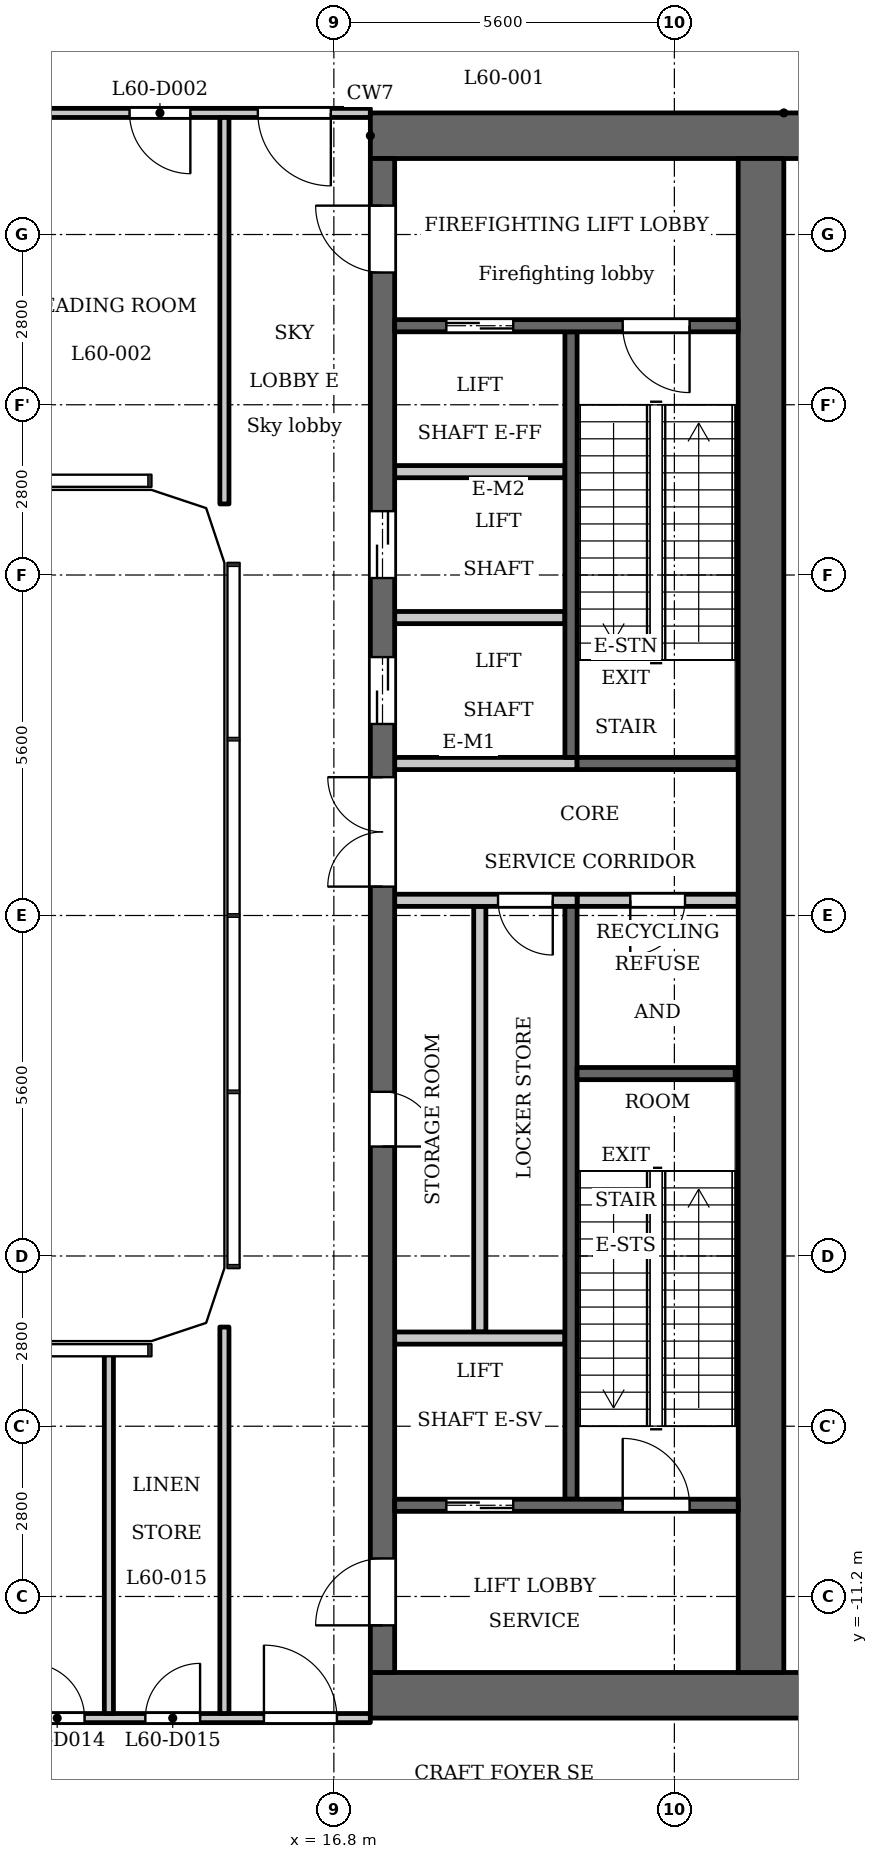
"""IFC4 building model, lengths in metres.
Left out: names, types, materials, properties, quantities, classifications, styles, units other than length and angle.
Written with IfcOpenShell. Run it as: python <this file> out.ifc"""

import sys

from ifc_helpers import new_model, si_unit, direction, frame, frame_2d, origin, place, context, subcontext, project, spatial, polyline, rectangle, outline, extrude, element, fill, save


model = new_model("IFC4")
c1 = context("Model", 3, precision=1e-05, world=origin(), true_north=direction((0.0, 1.0)))
c2 = subcontext(c1, "Body", "Model", "MODEL_VIEW")
j1 = project(units=[si_unit("LENGTHUNIT", "METRE"), si_unit("PLANEANGLEUNIT", "RADIAN")], contexts=[c1])
p1 = place(None, origin())
s1 = spatial("IfcSite", under=j1, at=p1, CompositionType="ELEMENT")
p2 = place(p1, origin())
s2 = spatial("IfcBuilding", under=s1, at=p2, CompositionType="ELEMENT")
p3 = place(p2, frame((0.0, 0.0, 230.9)))
s3 = spatial("IfcBuildingStorey", under=s2, at=p3, CompositionType="ELEMENT", Elevation=230.9)
p4 = place(p3, frame((20.7, 2.6, 0.0), z_axis=(0.0, 0.0, 1.0), x_axis=(0.0, 1.0, 0.0)))
e1 = element("IfcWall", 1, at=p4, inside=s3, PredefinedType="SHEAR", context=c2, shape_type="SweptSolid", body=[
    extrude(rectangle(XDim=7.0, YDim=0.2, at=frame_2d((3.5, 0.0))), origin(), (0.0, 0.0, 1.0), 4.95),
])
p5 = place(p3, frame((20.7, -9.6, 0.0), z_axis=(0.0, 0.0, 1.0), x_axis=(0.0, 1.0, 0.0)))
e2 = element("IfcWall", 2, at=p5, inside=s3, PredefinedType="SHEAR", context=c2, shape_type="SweptSolid", body=[
    extrude(rectangle(XDim=9.75, YDim=0.2, at=frame_2d((4.875, 0.0))), origin(), (0.0, 0.0, 1.0), 4.95),
])
p6 = place(p3, frame((20.8, 2.5, 0.0), z_axis=(0.0, 0.0, 1.0), x_axis=(1.0, 0.0, 0.0)))
e3 = element("IfcWall", 3, at=p6, inside=s3, PredefinedType="SHEAR", context=c2, shape_type="SweptSolid", body=[
    extrude(rectangle(XDim=2.65, YDim=0.2, at=frame_2d((1.325, 0.0))), origin(), (0.0, 0.0, 1.0), 4.95),
])
p7 = place(p3, frame((20.8, 0.25, 0.0), z_axis=(0.0, 0.0, 1.0), x_axis=(1.0, 0.0, 0.0)))
e4 = element("IfcWall", 4, at=p7, inside=s3, PredefinedType="PARTITIONING", context=c2, shape_type="SweptSolid", body=[
    extrude(rectangle(XDim=2.65, YDim=0.2, at=frame_2d((1.325, 0.0))), origin(), (0.0, 0.0, 1.0), 4.95),
])
p8 = place(p7, frame((0.875, 0.0, 0.0)))
e5 = element("IfcOpeningElement", 5, at=p8, cuts=e4, PredefinedType="OPENING", context=c2, shape_type="SweptSolid", body=[
    extrude(rectangle(XDim=0.9, YDim=2.1, at=frame_2d((0.45, 1.05))), frame((0.0, 0.11, 0.0), z_axis=(0.0, -1.0, 0.0), x_axis=(1.0, 0.0, 0.0)), (0.0, 0.0, 1.0), 0.22),
])
for number, where, z_axis, x_axis in (
    (6, (17.4, 12.825, 0.0), (0.0, 0.0, 1.0), (1.0, 0.0, 0.0)),
    (7, (17.4, -12.825, 0.0), (0.0, 0.0, 1.0), (1.0, 0.0, 0.0)),
):
    element("IfcWall", number, at=place(p3, frame(where, z_axis=z_axis, x_axis=x_axis)), inside=s3, PredefinedType="SHEAR", context=c2, shape_type="SweptSolid", body=[
        extrude(rectangle(XDim=7.6, YDim=0.75, at=frame_2d((3.8, 0.0))), origin(), (0.0, 0.0, 1.0), 4.95),
    ])
p9 = place(p3, frame((19.2, -6.85, 0.0), z_axis=(0.0, 0.0, 1.0), x_axis=(0.0, 1.0, 0.0)))
e8 = element("IfcWall", 8, at=p9, inside=s3, PredefinedType="PARTITIONING", context=c2, shape_type="SweptSolid", body=[
    extrude(rectangle(XDim=7.0, YDim=0.2, at=frame_2d((3.5, 0.0))), origin(), (0.0, 0.0, 1.0), 4.95),
])
p10 = place(p3, frame((17.6, -12.45, 0.0), z_axis=(0.0, 0.0, 1.0), x_axis=(0.0, 1.0, 0.0)))
e9 = element("IfcWall", 9, at=p10, inside=s3, PredefinedType="SHEAR", context=c2, shape_type="SweptSolid", body=[
    extrude(rectangle(XDim=24.9, YDim=0.4, at=frame_2d((12.45, 0.0))), origin(), (0.0, 0.0, 1.0), 4.95),
])
p11 = place(p10, frame((8.65, 0.0, 0.0)))
e10 = element("IfcOpeningElement", 10, at=p11, cuts=e9, PredefinedType="OPENING", context=c2, shape_type="SweptSolid", body=[
    extrude(rectangle(XDim=0.9, YDim=2.1, at=frame_2d((0.45, 1.05))), frame((0.0, 0.21, 0.0), z_axis=(0.0, -1.0, 0.0), x_axis=(1.0, 0.0, 0.0)), (0.0, 0.0, 1.0), 0.42),
])
p12 = place(p10, frame((15.6, 0.0, 0.0)))
e11 = element("IfcOpeningElement", 11, at=p12, cuts=e9, PredefinedType="OPENING", context=c2, shape_type="SweptSolid", body=[
    extrude(rectangle(XDim=1.1, YDim=2.1, at=frame_2d((0.55, 1.05))), frame((0.0, 0.21, 0.0), z_axis=(0.0, -1.0, 0.0), x_axis=(1.0, 0.0, 0.0)), (0.0, 0.0, 1.0), 0.42),
])
p13 = place(p10, frame((18.0, 0.0, 0.0)))
e12 = element("IfcOpeningElement", 12, at=p13, cuts=e9, PredefinedType="OPENING", context=c2, shape_type="SweptSolid", body=[
    extrude(rectangle(XDim=1.1, YDim=2.1, at=frame_2d((0.55, 1.05))), frame((0.0, 0.21, 0.0), z_axis=(0.0, -1.0, 0.0), x_axis=(1.0, 0.0, 0.0)), (0.0, 0.0, 1.0), 0.42),
])
p14 = place(p10, frame((23.025, 0.0, 0.0)))
e13 = element("IfcOpeningElement", 13, at=p14, cuts=e9, PredefinedType="OPENING", context=c2, shape_type="SweptSolid", body=[
    extrude(rectangle(XDim=1.1, YDim=2.1, at=frame_2d((0.55, 1.05))), frame((0.0, 0.21, 0.0), z_axis=(0.0, -1.0, 0.0), x_axis=(1.0, 0.0, 0.0)), (0.0, 0.0, 1.0), 0.42),
])
p15 = place(p10, frame((0.775, 0.0, 0.0)))
e14 = element("IfcOpeningElement", 14, at=p15, cuts=e9, PredefinedType="OPENING", context=c2, shape_type="SweptSolid", body=[
    extrude(rectangle(XDim=1.1, YDim=2.1, at=frame_2d((0.55, 1.05))), frame((0.0, 0.21, 0.0), z_axis=(0.0, -1.0, 0.0), x_axis=(1.0, 0.0, 0.0)), (0.0, 0.0, 1.0), 0.42),
])
p16 = place(p10, frame((12.925, 0.0, 0.0)))
e15 = element("IfcOpeningElement", 15, at=p16, cuts=e9, PredefinedType="OPENING", context=c2, shape_type="SweptSolid", body=[
    extrude(rectangle(XDim=1.8, YDim=2.1, at=frame_2d((0.9, 1.05))), frame((0.0, 0.21, 0.0), z_axis=(0.0, -1.0, 0.0), x_axis=(1.0, 0.0, 0.0)), (0.0, 0.0, 1.0), 0.42),
])
p17 = place(p3, frame((23.825, -12.45, 0.0), z_axis=(0.0, 0.0, 1.0), x_axis=(0.0, 1.0, 0.0)))
e16 = element("IfcWall", 16, at=p17, inside=s3, PredefinedType="SHEAR", context=c2, shape_type="SweptSolid", body=[
    extrude(rectangle(XDim=24.9, YDim=0.75, at=frame_2d((12.45, 0.0))), origin(), (0.0, 0.0, 1.0), 4.95),
])
p18 = place(p3, frame((17.8, -9.7, 0.0), z_axis=(0.0, 0.0, 1.0), x_axis=(1.0, 0.0, 0.0)))
e17 = element("IfcWall", 17, at=p18, inside=s3, PredefinedType="SHEAR", context=c2, shape_type="SweptSolid", body=[
    extrude(rectangle(XDim=5.65, YDim=0.2, at=frame_2d((2.825, 0.0))), origin(), (0.0, 0.0, 1.0), 4.95),
])
p19 = place(p18, frame((0.85, 0.0, 0.0)))
e18 = element("IfcOpeningElement", 18, at=p19, cuts=e17, PredefinedType="OPENING", context=c2, shape_type="SweptSolid", body=[
    extrude(rectangle(XDim=1.1, YDim=2.1, at=frame_2d((0.55, 1.05))), frame((0.0, 0.11, 0.0), z_axis=(0.0, -1.0, 0.0), x_axis=(1.0, 0.0, 0.0)), (0.0, 0.0, 1.0), 0.22),
])
p20 = place(p18, frame((3.75, 0.0, 0.0)))
e19 = element("IfcOpeningElement", 19, at=p20, cuts=e17, PredefinedType="OPENING", context=c2, shape_type="SweptSolid", body=[
    extrude(rectangle(XDim=1.1, YDim=2.1, at=frame_2d((0.55, 1.05))), frame((0.0, 0.11, 0.0), z_axis=(0.0, -1.0, 0.0), x_axis=(1.0, 0.0, 0.0)), (0.0, 0.0, 1.0), 0.22),
])
p21 = place(p3, frame((17.8, -6.95, 0.0), z_axis=(0.0, 0.0, 1.0), x_axis=(1.0, 0.0, 0.0)))
e20 = element("IfcWall", 20, at=p21, inside=s3, PredefinedType="PARTITIONING", context=c2, shape_type="SweptSolid", body=[
    extrude(rectangle(XDim=2.8, YDim=0.2, at=frame_2d((1.4, 0.0))), origin(), (0.0, 0.0, 1.0), 4.95),
])
p22 = place(p3, frame((17.8, 0.25, 0.0), z_axis=(0.0, 0.0, 1.0), x_axis=(1.0, 0.0, 0.0)))
e21 = element("IfcWall", 21, at=p22, inside=s3, PredefinedType="PARTITIONING", context=c2, shape_type="SweptSolid", body=[
    extrude(rectangle(XDim=3.0, YDim=0.2, at=frame_2d((1.5, 0.0))), origin(), (0.0, 0.0, 1.0), 4.95),
])
p23 = place(p22, frame((1.7, 0.0, 0.0)))
e22 = element("IfcOpeningElement", 22, at=p23, cuts=e21, PredefinedType="OPENING", context=c2, shape_type="SweptSolid", body=[
    extrude(rectangle(XDim=0.9, YDim=2.1, at=frame_2d((0.45, 1.05))), frame((0.0, 0.11, 0.0), z_axis=(0.0, -1.0, 0.0), x_axis=(1.0, 0.0, 0.0)), (0.0, 0.0, 1.0), 0.22),
])
p24 = place(p3, frame((17.8, 2.5, 0.0), z_axis=(0.0, 0.0, 1.0), x_axis=(1.0, 0.0, 0.0)))
e23 = element("IfcWall", 23, at=p24, inside=s3, PredefinedType="PARTITIONING", context=c2, shape_type="SweptSolid", body=[
    extrude(rectangle(XDim=3.0, YDim=0.2, at=frame_2d((1.5, 0.0))), origin(), (0.0, 0.0, 1.0), 4.95),
])
for number, where, z_axis, x_axis in (
    (24, (17.8, 4.9, 0.0), (0.0, 0.0, 1.0), (1.0, 0.0, 0.0)),
    (25, (17.8, 7.3, 0.0), (0.0, 0.0, 1.0), (1.0, 0.0, 0.0)),
):
    element("IfcWall", number, at=place(p3, frame(where, z_axis=z_axis, x_axis=x_axis)), inside=s3, PredefinedType="PARTITIONING", context=c2, shape_type="SweptSolid", body=[
        extrude(rectangle(XDim=2.8, YDim=0.2, at=frame_2d((1.4, 0.0))), origin(), (0.0, 0.0, 1.0), 4.95),
    ])
p25 = place(p3, frame((17.8, 9.7, 0.0), z_axis=(0.0, 0.0, 1.0), x_axis=(1.0, 0.0, 0.0)))
e26 = element("IfcWall", 26, at=p25, inside=s3, PredefinedType="SHEAR", context=c2, shape_type="SweptSolid", body=[
    extrude(rectangle(XDim=5.65, YDim=0.2, at=frame_2d((2.825, 0.0))), origin(), (0.0, 0.0, 1.0), 4.95),
])
p26 = place(p25, frame((0.85, 0.0, 0.0)))
e27 = element("IfcOpeningElement", 27, at=p26, cuts=e26, PredefinedType="OPENING", context=c2, shape_type="SweptSolid", body=[
    extrude(rectangle(XDim=1.1, YDim=2.1, at=frame_2d((0.55, 1.05))), frame((0.0, 0.11, 0.0), z_axis=(0.0, -1.0, 0.0), x_axis=(1.0, 0.0, 0.0)), (0.0, 0.0, 1.0), 0.22),
])
p27 = place(p25, frame((3.75, 0.0, 0.0)))
e28 = element("IfcOpeningElement", 28, at=p27, cuts=e26, PredefinedType="OPENING", context=c2, shape_type="SweptSolid", body=[
    extrude(rectangle(XDim=1.1, YDim=2.1, at=frame_2d((0.55, 1.05))), frame((0.0, 0.11, 0.0), z_axis=(0.0, -1.0, 0.0), x_axis=(1.0, 0.0, 0.0)), (0.0, 0.0, 1.0), 0.22),
])
p28 = place(p3, frame((20.8, -2.6, 0.0), z_axis=(0.0, 0.0, 1.0), x_axis=(1.0, 0.0, 0.0)))
e29 = element("IfcWall", 29, at=p28, inside=s3, PredefinedType="SHEAR", context=c2, shape_type="SweptSolid", body=[
    extrude(rectangle(XDim=2.6, YDim=0.2, at=frame_2d((1.3, 0.0))), origin(), (0.0, 0.0, 1.0), 4.95),
])
p29 = place(p3, frame((11.384, -13.2, 0.0), z_axis=(0.0, 0.0, 1.0), x_axis=(1.0, 0.0, 0.0)))
e30 = element("IfcWall", 30, at=p29, inside=s3, PredefinedType="PARTITIONING", context=c2, shape_type="SweptSolid", body=[
    extrude(rectangle(XDim=6.016, YDim=0.15, at=frame_2d((3.008, 0.0))), origin(), (0.0, 0.0, 1.0), 4.95),
])
p30 = place(p29, frame((4.266, 0.0, 0.0)))
e31 = element("IfcOpeningElement", 31, at=p30, cuts=e30, PredefinedType="OPENING", context=c2, shape_type="SweptSolid", body=[
    extrude(rectangle(XDim=1.2, YDim=2.1, at=frame_2d((0.6, 1.05))), frame((0.0, 0.085, 0.0), z_axis=(0.0, -1.0, 0.0), x_axis=(1.0, 0.0, 0.0)), (0.0, 0.0, 1.0), 0.17),
])
p31 = place(p29, frame((0.416, 0.0, 0.0)))
e32 = element("IfcOpeningElement", 32, at=p31, cuts=e30, PredefinedType="OPENING", context=c2, shape_type="SweptSolid", body=[
    extrude(rectangle(XDim=0.9, YDim=2.1, at=frame_2d((0.45, 1.05))), frame((0.0, 0.085, 0.0), z_axis=(0.0, -1.0, 0.0), x_axis=(1.0, 0.0, 0.0)), (0.0, 0.0, 1.0), 0.17),
])
p32 = place(p29, frame((2.316, 0.0, 0.0)))
e33 = element("IfcOpeningElement", 33, at=p32, cuts=e30, PredefinedType="OPENING", context=c2, shape_type="SweptSolid", body=[
    extrude(rectangle(XDim=0.9, YDim=2.1, at=frame_2d((0.45, 1.05))), frame((0.0, 0.085, 0.0), z_axis=(0.0, -1.0, 0.0), x_axis=(1.0, 0.0, 0.0)), (0.0, 0.0, 1.0), 0.17),
])
p33 = place(p3, frame((11.384, 13.2, 0.0), z_axis=(0.0, 0.0, 1.0), x_axis=(1.0, 0.0, 0.0)))
e34 = element("IfcWall", 34, at=p33, inside=s3, PredefinedType="PARTITIONING", context=c2, shape_type="SweptSolid", body=[
    extrude(rectangle(XDim=6.016, YDim=0.15, at=frame_2d((3.008, 0.0))), origin(), (0.0, 0.0, 1.0), 4.95),
])
p34 = place(p33, frame((4.166, 0.0, 0.0)))
e35 = element("IfcOpeningElement", 35, at=p34, cuts=e34, PredefinedType="OPENING", context=c2, shape_type="SweptSolid", body=[
    extrude(rectangle(XDim=1.2, YDim=2.1, at=frame_2d((0.6, 1.05))), frame((0.0, 0.085, 0.0), z_axis=(0.0, -1.0, 0.0), x_axis=(1.0, 0.0, 0.0)), (0.0, 0.0, 1.0), 0.17),
])
p35 = place(p33, frame((2.056, 0.0, 0.0)))
e36 = element("IfcOpeningElement", 36, at=p35, cuts=e34, PredefinedType="OPENING", context=c2, shape_type="SweptSolid", body=[
    extrude(rectangle(XDim=1.0, YDim=2.1, at=frame_2d((0.5, 1.05))), frame((0.0, 0.085, 0.0), z_axis=(0.0, -1.0, 0.0), x_axis=(1.0, 0.0, 0.0)), (0.0, 0.0, 1.0), 0.17),
])
p36 = place(p3, frame((13.1, -13.125, 0.0), z_axis=(0.0, 0.0, 1.0), x_axis=(0.0, 1.0, 0.0)))
e37 = element("IfcWall", 37, at=p36, inside=s3, PredefinedType="PARTITIONING", context=c2, shape_type="SweptSolid", body=[
    extrude(rectangle(XDim=5.941, YDim=0.15, at=frame_2d((2.97, 0.0))), origin(), (0.0, 0.0, 1.0), 4.95),
])
for number, where, z_axis, x_axis in (
    (38, (15.0, -13.125, 0.0), (0.0, 0.0, 1.0), (0.0, 1.0, 0.0)),
    (39, (15.0, 6.769, 0.0), (0.0, 0.0, 1.0), (0.0, 1.0, 0.0)),
):
    element("IfcWall", number, at=place(p3, frame(where, z_axis=z_axis, x_axis=x_axis)), inside=s3, PredefinedType="PARTITIONING", context=c2, shape_type="SweptSolid", body=[
        extrude(rectangle(XDim=6.356, YDim=0.15, at=frame_2d((3.178, 0.0))), origin(), (0.0, 0.0, 1.0), 4.95),
    ])
p37 = place(p3, origin())
e40 = element("IfcWall", 40, at=p37, inside=s3, PredefinedType="SOLIDWALL", context=c2, shape_type="SweptSolid", body=[
    extrude(outline(polyline([(13.8, 7.0), (14.7, 6.7), (15.0, 5.8), (15.3, 5.8), (15.3, 5.849), (14.937, 6.937), (13.849, 7.3), (13.8, 7.3), (13.8, 7.0)])), origin(), (0.0, 0.0, 1.0), 4.95),
])
e41 = element("IfcWall", 41, at=p37, inside=s3, PredefinedType="SOLIDWALL", context=c2, shape_type="SweptSolid", body=[
    extrude(outline(polyline([(15.0, -5.8), (14.7, -6.7), (13.8, -7.0), (13.8, -7.3), (13.849, -7.3), (14.937, -6.937), (15.3, -5.849), (15.3, -5.8), (15.0, -5.8)])), origin(), (0.0, 0.0, 1.0), 4.95),
])
p38 = place(p19, origin())
e42 = element("IfcDoor", 42, at=p38, inside=s3, OperationType="DOUBLE_DOOR_SLIDING", PredefinedType="DOOR", context=c2, shape_type="SweptSolid", body=[
    extrude(rectangle(XDim=1.1, YDim=2.1, at=frame_2d((0.55, 1.05))), frame((0.0, 0.025, 0.0), z_axis=(0.0, -1.0, 0.0), x_axis=(1.0, 0.0, 0.0)), (0.0, 0.0, 1.0), 0.05),
])
fill(e18, e42)
p39 = place(p11, origin())
e43 = element("IfcDoor", 43, at=p39, inside=s3, OperationType="SINGLE_SWING_LEFT", PredefinedType="DOOR", context=c2, shape_type="SweptSolid", body=[
    extrude(rectangle(XDim=0.9, YDim=2.1, at=frame_2d((0.45, 1.05))), frame((0.0, 0.025, 0.0), z_axis=(0.0, -1.0, 0.0), x_axis=(1.0, 0.0, 0.0)), (0.0, 0.0, 1.0), 0.05),
])
fill(e10, e43)
p40 = place(p23, origin())
e44 = element("IfcDoor", 44, at=p40, inside=s3, OperationType="SINGLE_SWING_RIGHT", PredefinedType="DOOR", context=c2, shape_type="SweptSolid", body=[
    extrude(rectangle(XDim=0.9, YDim=2.1, at=frame_2d((0.45, 1.05))), frame((0.0, 0.025, 0.0), z_axis=(0.0, -1.0, 0.0), x_axis=(1.0, 0.0, 0.0)), (0.0, 0.0, 1.0), 0.05),
])
fill(e22, e44)
p41 = place(p12, origin())
e45 = element("IfcDoor", 45, at=p41, inside=s3, OperationType="DOUBLE_DOOR_SLIDING", PredefinedType="DOOR", context=c2, shape_type="SweptSolid", body=[
    extrude(rectangle(XDim=1.1, YDim=2.1, at=frame_2d((0.55, 1.05))), frame((0.0, 0.025, 0.0), z_axis=(0.0, -1.0, 0.0), x_axis=(1.0, 0.0, 0.0)), (0.0, 0.0, 1.0), 0.05),
])
fill(e11, e45)
p42 = place(p13, origin())
e46 = element("IfcDoor", 46, at=p42, inside=s3, OperationType="DOUBLE_DOOR_SLIDING", PredefinedType="DOOR", context=c2, shape_type="SweptSolid", body=[
    extrude(rectangle(XDim=1.1, YDim=2.1, at=frame_2d((0.55, 1.05))), frame((0.0, 0.025, 0.0), z_axis=(0.0, -1.0, 0.0), x_axis=(1.0, 0.0, 0.0)), (0.0, 0.0, 1.0), 0.05),
])
fill(e12, e46)
p43 = place(p26, origin())
e47 = element("IfcDoor", 47, at=p43, inside=s3, OperationType="DOUBLE_DOOR_SLIDING", PredefinedType="DOOR", context=c2, shape_type="SweptSolid", body=[
    extrude(rectangle(XDim=1.1, YDim=2.1, at=frame_2d((0.55, 1.05))), frame((0.0, 0.025, 0.0), z_axis=(0.0, -1.0, 0.0), x_axis=(1.0, 0.0, 0.0)), (0.0, 0.0, 1.0), 0.05),
])
fill(e27, e47)
p44 = place(p14, origin())
e48 = element("IfcDoor", 48, at=p44, inside=s3, OperationType="SINGLE_SWING_LEFT", PredefinedType="DOOR", context=c2, shape_type="SweptSolid", body=[
    extrude(rectangle(XDim=1.1, YDim=2.1, at=frame_2d((0.55, 1.05))), frame((0.0, 0.025, 0.0), z_axis=(0.0, -1.0, 0.0), x_axis=(1.0, 0.0, 0.0)), (0.0, 0.0, 1.0), 0.05),
])
fill(e13, e48)
p45 = place(p15, origin())
e49 = element("IfcDoor", 49, at=p45, inside=s3, OperationType="SINGLE_SWING_RIGHT", PredefinedType="DOOR", context=c2, shape_type="SweptSolid", body=[
    extrude(rectangle(XDim=1.1, YDim=2.1, at=frame_2d((0.55, 1.05))), frame((0.0, 0.025, 0.0), z_axis=(0.0, -1.0, 0.0), x_axis=(1.0, 0.0, 0.0)), (0.0, 0.0, 1.0), 0.05),
])
fill(e14, e49)
p46 = place(p27, origin())
e50 = element("IfcDoor", 50, at=p46, inside=s3, OperationType="SINGLE_SWING_RIGHT", PredefinedType="DOOR", context=c2, shape_type="SweptSolid", body=[
    extrude(rectangle(XDim=1.1, YDim=2.1, at=frame_2d((0.55, 1.05))), frame((0.0, 0.025, 0.0), z_axis=(0.0, -1.0, 0.0), x_axis=(1.0, 0.0, 0.0)), (0.0, 0.0, 1.0), 0.05),
])
fill(e28, e50)
p47 = place(p20, origin())
e51 = element("IfcDoor", 51, at=p47, inside=s3, OperationType="SINGLE_SWING_RIGHT", PredefinedType="DOOR", context=c2, shape_type="SweptSolid", body=[
    extrude(rectangle(XDim=1.1, YDim=2.1, at=frame_2d((0.55, 1.05))), frame((0.0, 0.025, 0.0), z_axis=(0.0, -1.0, 0.0), x_axis=(1.0, 0.0, 0.0)), (0.0, 0.0, 1.0), 0.05),
])
fill(e19, e51)
p48 = place(p16, origin())
e52 = element("IfcDoor", 52, at=p48, inside=s3, OperationType="DOUBLE_DOOR_SINGLE_SWING", PredefinedType="DOOR", context=c2, shape_type="SweptSolid", body=[
    extrude(rectangle(XDim=1.8, YDim=2.1, at=frame_2d((0.9, 1.05))), frame((0.0, 0.025, 0.0), z_axis=(0.0, -1.0, 0.0), x_axis=(1.0, 0.0, 0.0)), (0.0, 0.0, 1.0), 0.05),
])
fill(e15, e52)
p49 = place(p8, origin())
e53 = element("IfcDoor", 53, at=p49, inside=s3, OperationType="SINGLE_SWING_LEFT", PredefinedType="DOOR", context=c2, shape_type="SweptSolid", body=[
    extrude(rectangle(XDim=0.9, YDim=2.1, at=frame_2d((0.45, 1.05))), frame((0.0, 0.025, 0.0), z_axis=(0.0, -1.0, 0.0), x_axis=(1.0, 0.0, 0.0)), (0.0, 0.0, 1.0), 0.05),
])
fill(e5, e53)
p50 = place(p34, origin())
e54 = element("IfcDoor", 54, at=p50, inside=s3, OperationType="SINGLE_SWING_RIGHT", PredefinedType="DOOR", context=c2, shape_type="SweptSolid", body=[
    extrude(rectangle(XDim=1.2, YDim=2.1, at=frame_2d((0.6, 1.05))), frame((0.0, 0.025, 0.0), z_axis=(0.0, -1.0, 0.0), x_axis=(1.0, 0.0, 0.0)), (0.0, 0.0, 1.0), 0.05),
])
fill(e35, e54)
p51 = place(p35, origin())
e55 = element("IfcDoor", 55, at=p51, inside=s3, OperationType="SINGLE_SWING_RIGHT", PredefinedType="DOOR", context=c2, shape_type="SweptSolid", body=[
    extrude(rectangle(XDim=1.0, YDim=2.1, at=frame_2d((0.5, 1.05))), frame((0.0, 0.025, 0.0), z_axis=(0.0, -1.0, 0.0), x_axis=(1.0, 0.0, 0.0)), (0.0, 0.0, 1.0), 0.05),
])
fill(e36, e55)
p52 = place(p30, origin())
e56 = element("IfcDoor", 56, at=p52, inside=s3, OperationType="SINGLE_SWING_RIGHT", PredefinedType="DOOR", context=c2, shape_type="SweptSolid", body=[
    extrude(rectangle(XDim=1.2, YDim=2.1, at=frame_2d((0.6, 1.05))), frame((0.0, 0.025, 0.0), z_axis=(0.0, -1.0, 0.0), x_axis=(1.0, 0.0, 0.0)), (0.0, 0.0, 1.0), 0.05),
])
fill(e31, e56)
p53 = place(p31, origin())
e57 = element("IfcDoor", 57, at=p53, inside=s3, OperationType="SINGLE_SWING_RIGHT", PredefinedType="DOOR", context=c2, shape_type="SweptSolid", body=[
    extrude(rectangle(XDim=0.9, YDim=2.1, at=frame_2d((0.45, 1.05))), frame((0.0, 0.025, 0.0), z_axis=(0.0, -1.0, 0.0), x_axis=(1.0, 0.0, 0.0)), (0.0, 0.0, 1.0), 0.05),
])
fill(e32, e57)
p54 = place(p32, origin())
e58 = element("IfcDoor", 58, at=p54, inside=s3, OperationType="SINGLE_SWING_LEFT", PredefinedType="DOOR", context=c2, shape_type="SweptSolid", body=[
    extrude(rectangle(XDim=0.9, YDim=2.1, at=frame_2d((0.45, 1.05))), frame((0.0, 0.025, 0.0), z_axis=(0.0, -1.0, 0.0), x_axis=(1.0, 0.0, 0.0)), (0.0, 0.0, 1.0), 0.05),
])
fill(e33, e58)
save(model, sys.argv[1])
